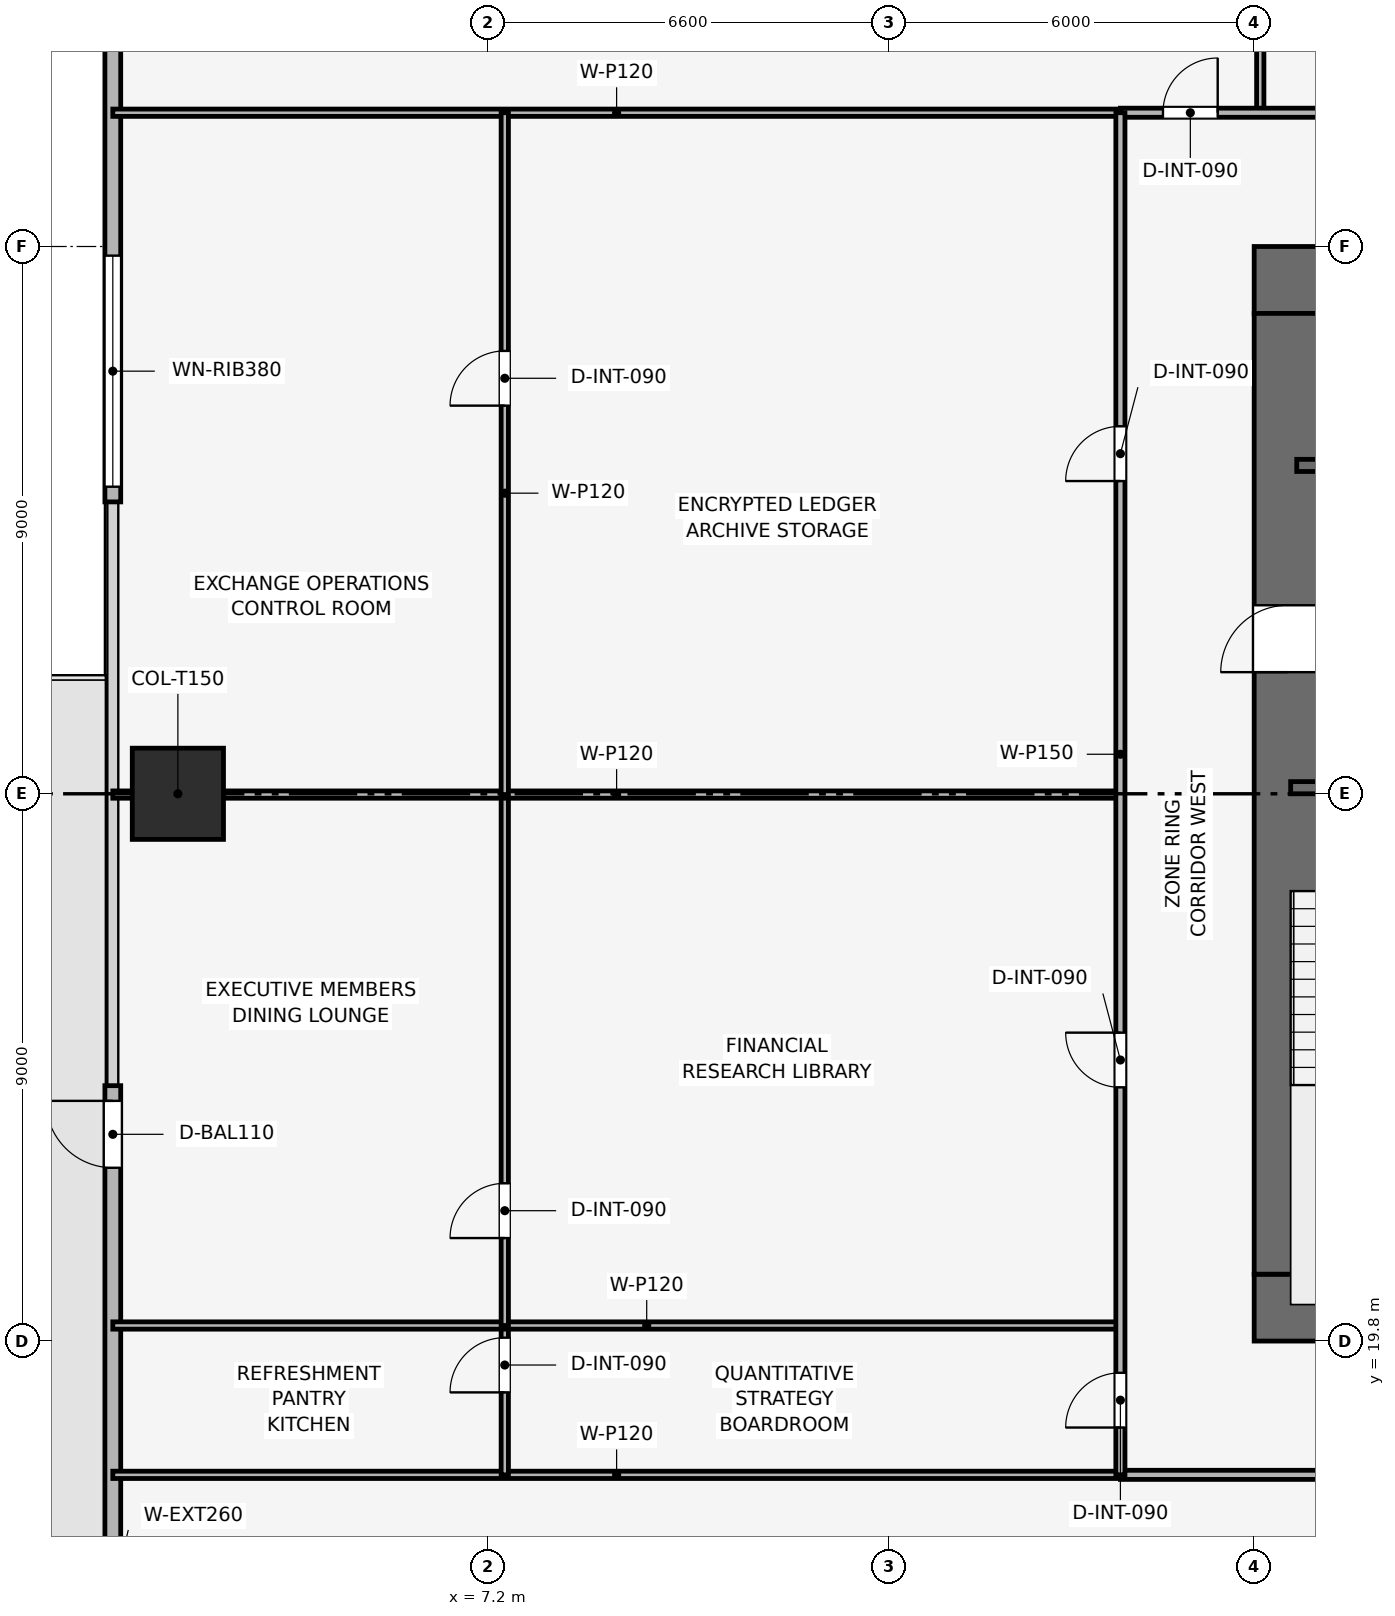
"""IFC4 building model, lengths in metres.
Left out: names, types, materials, properties, quantities, classifications, styles, units other than length and angle.
Written with IfcOpenShell. Run it as: python <this file> out.ifc"""

import sys

from ifc_helpers import new_model, si_unit, direction, frame, frame_2d, origin, origin_2d, place, context, subcontext, project, spatial, rectangle, extrude, element, fill, save


model = new_model("IFC4")
c1 = context("Model", 3, precision=1e-05, world=origin(), true_north=direction((0.0, 1.0)))
c2 = subcontext(c1, "Body", "Model", "MODEL_VIEW")
j1 = project(units=[si_unit("LENGTHUNIT", "METRE"), si_unit("PLANEANGLEUNIT", "RADIAN")], contexts=[c1])
p1 = place(None, origin())
s1 = spatial("IfcSite", under=j1, at=p1, CompositionType="ELEMENT")
p2 = place(p1, origin())
s2 = spatial("IfcBuilding", under=s1, at=p2, CompositionType="ELEMENT")
p3 = place(p2, frame((0.0, 0.0, 45.6)))
s3 = spatial("IfcBuildingStorey", under=s2, at=p3, CompositionType="ELEMENT", Elevation=45.6)
p4 = place(p3, frame((19.8, 20.35, 0.0), z_axis=(0.0, 0.0, 1.0), x_axis=(1.0, 0.0, 0.0)))
e1 = element("IfcWall", 1, at=p4, inside=s3, PredefinedType="SHEAR", context=c2, shape_type="SweptSolid", body=[
    extrude(rectangle(XDim=18.0, YDim=1.1, at=frame_2d((9.0, 0.0))), origin(), (0.0, 0.0, 1.0), 3.9),
])
p5 = place(p4, frame((8.4, 0.0, 0.0)))
e2 = element("IfcOpeningElement", 2, at=p5, cuts=e1, PredefinedType="OPENING", context=c2, shape_type="SweptSolid", body=[
    extrude(rectangle(XDim=1.2, YDim=2.2, at=frame_2d((0.6, 1.1))), frame((0.0, 0.56, 0.0), z_axis=(0.0, -1.0, 0.0), x_axis=(1.0, 0.0, 0.0)), (0.0, 0.0, 1.0), 1.12),
])
p6 = place(p3, frame((19.8, 37.25, 0.0), z_axis=(0.0, 0.0, 1.0), x_axis=(1.0, 0.0, 0.0)))
e3 = element("IfcWall", 3, at=p6, inside=s3, PredefinedType="SHEAR", context=c2, shape_type="SweptSolid", body=[
    extrude(rectangle(XDim=18.0, YDim=1.1, at=frame_2d((9.0, 0.0))), origin(), (0.0, 0.0, 1.0), 3.9),
])
p7 = place(p6, frame((7.05, 0.0, 0.0)))
e4 = element("IfcOpeningElement", 4, at=p7, cuts=e3, PredefinedType="OPENING", context=c2, shape_type="SweptSolid", body=[
    extrude(rectangle(XDim=1.1, YDim=2.15, at=frame_2d((0.55, 1.075))), frame((0.0, 0.56, 0.0), z_axis=(0.0, -1.0, 0.0), x_axis=(1.0, 0.0, 0.0)), (0.0, 0.0, 1.0), 1.12),
])
p8 = place(p3, frame((20.35, 20.9, 0.0), z_axis=(0.0, 0.0, 1.0), x_axis=(0.0, 1.0, 0.0)))
e5 = element("IfcWall", 5, at=p8, inside=s3, PredefinedType="SHEAR", context=c2, shape_type="SweptSolid", body=[
    extrude(rectangle(XDim=15.8, YDim=1.1, at=frame_2d((7.9, 0.0))), origin(), (0.0, 0.0, 1.0), 3.9),
])
p9 = place(p8, frame((9.9, 0.0, 0.0)))
e6 = element("IfcOpeningElement", 6, at=p9, cuts=e5, PredefinedType="OPENING", context=c2, shape_type="SweptSolid", body=[
    extrude(rectangle(XDim=1.1, YDim=2.15, at=frame_2d((0.55, 1.075))), frame((0.0, 0.56, 0.0), z_axis=(0.0, -1.0, 0.0), x_axis=(1.0, 0.0, 0.0)), (0.0, 0.0, 1.0), 1.12),
])
p10 = place(p3, frame((2.1, 28.8, 0.003), z_axis=(0.0, 0.0, 1.0), x_axis=(1.0, 0.0, 0.0)))
e7 = element("IfcColumn", 7, at=p10, inside=s3, PredefinedType="COLUMN", context=c2, shape_type="SweptSolid", body=[
    extrude(rectangle(XDim=1.5, YDim=1.5, at=origin_2d()), origin(), (0.0, 0.0, 1.0), 3.644),
])
p11 = place(p3, frame((1.03, 8.7, 0.0), z_axis=(0.0, 0.0, 1.0), x_axis=(0.0, 1.0, 0.0)))
e8 = element("IfcWall", 8, at=p11, inside=s3, PredefinedType="SOLIDWALL", context=c2, shape_type="SweptSolid", body=[
    extrude(rectangle(XDim=15.3, YDim=0.26, at=frame_2d((7.65, 0.0))), origin(), (0.0, 0.0, 1.0), 3.65),
])
p12 = place(p11, frame((13.95, 0.0, 0.0)))
e9 = element("IfcOpeningElement", 9, at=p12, cuts=e8, PredefinedType="OPENING", context=c2, shape_type="SweptSolid", body=[
    extrude(rectangle(XDim=1.1, YDim=2.2, at=frame_2d((0.55, 1.1))), frame((0.0, 0.14, 0.0), z_axis=(0.0, -1.0, 0.0), x_axis=(1.0, 0.0, 0.0)), (0.0, 0.0, 1.0), 0.28),
])
p13 = place(p3, frame((1.03, 33.6, 0.0), z_axis=(0.0, 0.0, 1.0), x_axis=(0.0, 1.0, 0.0)))
e10 = element("IfcWall", 10, at=p13, inside=s3, PredefinedType="SOLIDWALL", context=c2, shape_type="SweptSolid", body=[
    extrude(rectangle(XDim=15.3, YDim=0.26, at=frame_2d((7.65, 0.0))), origin(), (0.0, 0.0, 1.0), 3.65),
])
p14 = place(p13, frame((0.25, 0.0, 0.9)))
e11 = element("IfcOpeningElement", 11, at=p14, cuts=e10, PredefinedType="OPENING", context=c2, shape_type="SweptSolid", body=[
    extrude(rectangle(XDim=3.8, YDim=1.9, at=frame_2d((1.9, 0.95))), frame((0.0, 0.14, 0.0), z_axis=(0.0, -1.0, 0.0), x_axis=(1.0, 0.0, 0.0)), (0.0, 0.0, 1.0), 0.28),
])
p15 = place(p3, frame((20.4, 28.9, 0.0), z_axis=(0.0, 0.0, 1.0), x_axis=(1.0, 0.0, 0.0)))
e12 = element("IfcWall", 12, at=p15, inside=s3, PredefinedType="SHEAR", context=c2, shape_type="SweptSolid", body=[
    extrude(rectangle(XDim=3.15, YDim=0.2, at=frame_2d((1.575, 0.0))), origin(), (0.0, 0.0, 1.0), 3.65),
])
p16 = place(p15, frame((0.8, 0.0, 0.0)))
e13 = element("IfcOpeningElement", 13, at=p16, cuts=e12, PredefinedType="OPENING", context=c2, shape_type="SweptSolid", body=[
    extrude(rectangle(XDim=1.0, YDim=2.1, at=frame_2d((0.5, 1.05))), frame((0.0, 0.11, 0.0), z_axis=(0.0, -1.0, 0.0), x_axis=(1.0, 0.0, 0.0)), (0.0, 0.0, 1.0), 0.22),
])
p17 = place(p3, frame((20.5, 34.2, 0.0), z_axis=(0.0, 0.0, 1.0), x_axis=(1.0, 0.0, 0.0)))
e14 = element("IfcWall", 14, at=p17, inside=s3, PredefinedType="SHEAR", context=c2, shape_type="SweptSolid", body=[
    extrude(rectangle(XDim=3.05, YDim=0.2, at=frame_2d((1.525, 0.0))), origin(), (0.0, 0.0, 1.0), 3.65),
])
p18 = place(p17, frame((0.75, 0.0, 0.0)))
e15 = element("IfcOpeningElement", 15, at=p18, cuts=e14, PredefinedType="OPENING", context=c2, shape_type="SweptSolid", body=[
    extrude(rectangle(XDim=1.1, YDim=2.15, at=frame_2d((0.55, 1.075))), frame((0.0, 0.11, 0.0), z_axis=(0.0, -1.0, 0.0), x_axis=(1.0, 0.0, 0.0)), (0.0, 0.0, 1.0), 0.22),
])
for number, where, z_axis, x_axis in (
    (16, (19.9, 40.0, 0.0), (0.0, 0.0, 1.0), (0.0, 1.0, 0.0)),
    (17, (1.03, 17.6, 0.0), (0.0, 0.0, 1.0), (1.0, 0.0, 0.0)),
    (18, (1.03, 40.0, 0.0), (0.0, 0.0, 1.0), (1.0, 0.0, 0.0)),
):
    element("IfcWall", number, at=place(p3, frame(where, z_axis=z_axis, x_axis=x_axis)), inside=s3, PredefinedType="PARTITIONING", context=c2, shape_type="SweptSolid", body=[
        extrude(rectangle(XDim=16.57, YDim=0.12, at=frame_2d((8.285, 0.0))), origin(), (0.0, 0.0, 1.0), 2.935),
    ])
p19 = place(p3, frame((7.476, 17.6, 0.0), z_axis=(0.0, 0.0, 1.0), x_axis=(0.0, 1.0, 0.0)))
e19 = element("IfcWall", 19, at=p19, inside=s3, PredefinedType="PARTITIONING", context=c2, shape_type="SweptSolid", body=[
    extrude(rectangle(XDim=2.456, YDim=0.12, at=frame_2d((1.228, 0.0))), origin(), (0.0, 0.0, 1.0), 3.65),
])
p20 = place(p19, frame((1.356, 0.0, 0.0)))
e20 = element("IfcOpeningElement", 20, at=p20, cuts=e19, PredefinedType="OPENING", context=c2, shape_type="SweptSolid", body=[
    extrude(rectangle(XDim=0.9, YDim=2.1, at=frame_2d((0.45, 1.05))), frame((0.0, 0.07, 0.0), z_axis=(0.0, -1.0, 0.0), x_axis=(1.0, 0.0, 0.0)), (0.0, 0.0, 1.0), 0.14),
])
p21 = place(p3, frame((1.03, 20.056, 0.0), z_axis=(0.0, 0.0, 1.0), x_axis=(1.0, 0.0, 0.0)))
e21 = element("IfcWall", 21, at=p21, inside=s3, PredefinedType="PARTITIONING", context=c2, shape_type="SweptSolid", body=[
    extrude(rectangle(XDim=16.57, YDim=0.12, at=frame_2d((8.285, 0.0))), origin(), (0.0, 0.0, 1.0), 2.935),
])
p22 = place(p3, frame((7.476, 20.056, 0.0), z_axis=(0.0, 0.0, 1.0), x_axis=(0.0, 1.0, 0.0)))
e22 = element("IfcWall", 22, at=p22, inside=s3, PredefinedType="PARTITIONING", context=c2, shape_type="SweptSolid", body=[
    extrude(rectangle(XDim=8.731, YDim=0.12, at=frame_2d((4.366, 0.0))), origin(), (0.0, 0.0, 1.0), 3.085),
])
p23 = place(p22, frame((1.438, 0.0, 0.0)))
e23 = element("IfcOpeningElement", 23, at=p23, cuts=e22, PredefinedType="OPENING", context=c2, shape_type="SweptSolid", body=[
    extrude(rectangle(XDim=0.9, YDim=2.1, at=frame_2d((0.45, 1.05))), frame((0.0, 0.07, 0.0), z_axis=(0.0, -1.0, 0.0), x_axis=(1.0, 0.0, 0.0)), (0.0, 0.0, 1.0), 0.14),
])
p24 = place(p3, frame((1.03, 28.787, 0.0), z_axis=(0.0, 0.0, 1.0), x_axis=(1.0, 0.0, 0.0)))
e24 = element("IfcWall", 24, at=p24, inside=s3, PredefinedType="PARTITIONING", context=c2, shape_type="SweptSolid", body=[
    extrude(rectangle(XDim=16.57, YDim=0.12, at=frame_2d((8.285, 0.0))), origin(), (0.0, 0.0, 1.0), 3.085),
])
p25 = place(p3, frame((7.476, 28.787, 0.0), z_axis=(0.0, 0.0, 1.0), x_axis=(0.0, 1.0, 0.0)))
e25 = element("IfcWall", 25, at=p25, inside=s3, PredefinedType="PARTITIONING", context=c2, shape_type="SweptSolid", body=[
    extrude(rectangle(XDim=11.213, YDim=0.12, at=frame_2d((5.606, 0.0))), origin(), (0.0, 0.0, 1.0), 3.085),
])
p26 = place(p25, frame((6.396, 0.0, 0.0)))
e26 = element("IfcOpeningElement", 26, at=p26, cuts=e25, PredefinedType="OPENING", context=c2, shape_type="SweptSolid", body=[
    extrude(rectangle(XDim=0.9, YDim=2.1, at=frame_2d((0.45, 1.05))), frame((0.0, 0.07, 0.0), z_axis=(0.0, -1.0, 0.0), x_axis=(1.0, 0.0, 0.0)), (0.0, 0.0, 1.0), 0.14),
])
p27 = place(p3, frame((17.6, 17.6, 0.0), z_axis=(0.0, 0.0, 1.0), x_axis=(1.0, 0.0, 0.0)))
e27 = element("IfcWall", 27, at=p27, inside=s3, PredefinedType="PARTITIONING", context=c2, shape_type="SweptSolid", body=[
    extrude(rectangle(XDim=22.4, YDim=0.15, at=frame_2d((11.2, 0.0))), origin(), (0.0, 0.0, 1.0), 3.085),
])
p28 = place(p27, frame((10.75, 0.0, 0.0)))
e28 = element("IfcOpeningElement", 28, at=p28, cuts=e27, PredefinedType="OPENING", context=c2, shape_type="SweptSolid", body=[
    extrude(rectangle(XDim=0.9, YDim=2.1, at=frame_2d((0.45, 1.05))), frame((0.0, 0.085, 0.0), z_axis=(0.0, -1.0, 0.0), x_axis=(1.0, 0.0, 0.0)), (0.0, 0.0, 1.0), 0.17),
])
p29 = place(p3, frame((17.6, 40.0, 0.0), z_axis=(0.0, 0.0, 1.0), x_axis=(1.0, 0.0, 0.0)))
e29 = element("IfcWall", 29, at=p29, inside=s3, PredefinedType="PARTITIONING", context=c2, shape_type="SweptSolid", body=[
    extrude(rectangle(XDim=22.4, YDim=0.15, at=frame_2d((11.2, 0.0))), origin(), (0.0, 0.0, 1.0), 3.085),
])
p30 = place(p29, frame((0.7, 0.0, 0.0)))
e30 = element("IfcOpeningElement", 30, at=p30, cuts=e29, PredefinedType="OPENING", context=c2, shape_type="SweptSolid", body=[
    extrude(rectangle(XDim=0.9, YDim=2.1, at=frame_2d((0.45, 1.05))), frame((0.0, 0.085, 0.0), z_axis=(0.0, -1.0, 0.0), x_axis=(1.0, 0.0, 0.0)), (0.0, 0.0, 1.0), 0.17),
])
p31 = place(p29, frame((4.706, 0.0, 0.0)))
e31 = element("IfcOpeningElement", 31, at=p31, cuts=e29, PredefinedType="OPENING", context=c2, shape_type="SweptSolid", body=[
    extrude(rectangle(XDim=0.9, YDim=2.1, at=frame_2d((0.45, 1.05))), frame((0.0, 0.085, 0.0), z_axis=(0.0, -1.0, 0.0), x_axis=(1.0, 0.0, 0.0)), (0.0, 0.0, 1.0), 0.17),
])
p32 = place(p29, frame((10.704, 0.0, 0.0)))
e32 = element("IfcOpeningElement", 32, at=p32, cuts=e29, PredefinedType="OPENING", context=c2, shape_type="SweptSolid", body=[
    extrude(rectangle(XDim=0.9, YDim=2.1, at=frame_2d((0.45, 1.05))), frame((0.0, 0.085, 0.0), z_axis=(0.0, -1.0, 0.0), x_axis=(1.0, 0.0, 0.0)), (0.0, 0.0, 1.0), 0.17),
])
p33 = place(p29, frame((17.898, 0.0, 0.0)))
e33 = element("IfcOpeningElement", 33, at=p33, cuts=e29, PredefinedType="OPENING", context=c2, shape_type="SweptSolid", body=[
    extrude(rectangle(XDim=0.9, YDim=2.1, at=frame_2d((0.45, 1.05))), frame((0.0, 0.085, 0.0), z_axis=(0.0, -1.0, 0.0), x_axis=(1.0, 0.0, 0.0)), (0.0, 0.0, 1.0), 0.17),
])
p34 = place(p3, frame((17.6, 17.6, 0.0), z_axis=(0.0, 0.0, 1.0), x_axis=(0.0, 1.0, 0.0)))
e34 = element("IfcWall", 34, at=p34, inside=s3, PredefinedType="PARTITIONING", context=c2, shape_type="SweptSolid", body=[
    extrude(rectangle(XDim=22.4, YDim=0.15, at=frame_2d((11.2, 0.0))), origin(), (0.0, 0.0, 1.0), 3.085),
])
p35 = place(p34, frame((0.778, 0.0, 0.0)))
e35 = element("IfcOpeningElement", 35, at=p35, cuts=e34, PredefinedType="OPENING", context=c2, shape_type="SweptSolid", body=[
    extrude(rectangle(XDim=0.9, YDim=2.1, at=frame_2d((0.45, 1.05))), frame((0.0, 0.085, 0.0), z_axis=(0.0, -1.0, 0.0), x_axis=(1.0, 0.0, 0.0)), (0.0, 0.0, 1.0), 0.17),
])
p36 = place(p34, frame((6.372, 0.0, 0.0)))
e36 = element("IfcOpeningElement", 36, at=p36, cuts=e34, PredefinedType="OPENING", context=c2, shape_type="SweptSolid", body=[
    extrude(rectangle(XDim=0.9, YDim=2.1, at=frame_2d((0.45, 1.05))), frame((0.0, 0.085, 0.0), z_axis=(0.0, -1.0, 0.0), x_axis=(1.0, 0.0, 0.0)), (0.0, 0.0, 1.0), 0.17),
])
p37 = place(p34, frame((16.343, 0.0, 0.0)))
e37 = element("IfcOpeningElement", 37, at=p37, cuts=e34, PredefinedType="OPENING", context=c2, shape_type="SweptSolid", body=[
    extrude(rectangle(XDim=0.9, YDim=2.1, at=frame_2d((0.45, 1.05))), frame((0.0, 0.085, 0.0), z_axis=(0.0, -1.0, 0.0), x_axis=(1.0, 0.0, 0.0)), (0.0, 0.0, 1.0), 0.17),
])
p38 = place(p12, origin())
e38 = element("IfcDoor", 38, at=p38, inside=s3, OperationType="SINGLE_SWING_RIGHT", PredefinedType="DOOR", context=c2, shape_type="SweptSolid", body=[
    extrude(rectangle(XDim=1.1, YDim=2.2, at=frame_2d((0.55, 1.1))), frame((0.0, 0.025, 0.0), z_axis=(0.0, -1.0, 0.0), x_axis=(1.0, 0.0, 0.0)), (0.0, 0.0, 1.0), 0.05),
])
fill(e9, e38)
p39 = place(p14, origin())
e39 = element("IfcWindow", 39, at=p39, inside=s3, PartitioningType="SINGLE_PANEL", PredefinedType="WINDOW", context=c2, shape_type="SweptSolid", body=[
    extrude(rectangle(XDim=3.8, YDim=1.9, at=frame_2d((1.9, 0.95))), frame((0.0, 0.03, 0.0), z_axis=(0.0, -1.0, 0.0), x_axis=(1.0, 0.0, 0.0)), (0.0, 0.0, 1.0), 0.06),
])
fill(e11, e39)
p40 = place(p20, origin())
e40 = element("IfcDoor", 40, at=p40, inside=s3, OperationType="SINGLE_SWING_LEFT", PredefinedType="DOOR", context=c2, shape_type="SweptSolid", body=[
    extrude(rectangle(XDim=0.9, YDim=2.1, at=frame_2d((0.45, 1.05))), frame((0.0, 0.025, 0.0), z_axis=(0.0, -1.0, 0.0), x_axis=(1.0, 0.0, 0.0)), (0.0, 0.0, 1.0), 0.05),
])
fill(e20, e40)
p41 = place(p23, origin())
e41 = element("IfcDoor", 41, at=p41, inside=s3, OperationType="SINGLE_SWING_LEFT", PredefinedType="DOOR", context=c2, shape_type="SweptSolid", body=[
    extrude(rectangle(XDim=0.9, YDim=2.1, at=frame_2d((0.45, 1.05))), frame((0.0, 0.025, 0.0), z_axis=(0.0, -1.0, 0.0), x_axis=(1.0, 0.0, 0.0)), (0.0, 0.0, 1.0), 0.05),
])
fill(e23, e41)
p42 = place(p26, origin())
e42 = element("IfcDoor", 42, at=p42, inside=s3, OperationType="SINGLE_SWING_LEFT", PredefinedType="DOOR", context=c2, shape_type="SweptSolid", body=[
    extrude(rectangle(XDim=0.9, YDim=2.1, at=frame_2d((0.45, 1.05))), frame((0.0, 0.025, 0.0), z_axis=(0.0, -1.0, 0.0), x_axis=(1.0, 0.0, 0.0)), (0.0, 0.0, 1.0), 0.05),
])
fill(e26, e42)
p43 = place(p30, origin())
e43 = element("IfcDoor", 43, at=p43, inside=s3, OperationType="SINGLE_SWING_RIGHT", PredefinedType="DOOR", context=c2, shape_type="SweptSolid", body=[
    extrude(rectangle(XDim=0.9, YDim=2.1, at=frame_2d((0.45, 1.05))), frame((0.0, 0.025, 0.0), z_axis=(0.0, -1.0, 0.0), x_axis=(1.0, 0.0, 0.0)), (0.0, 0.0, 1.0), 0.05),
])
fill(e30, e43)
p44 = place(p35, origin())
e44 = element("IfcDoor", 44, at=p44, inside=s3, OperationType="SINGLE_SWING_LEFT", PredefinedType="DOOR", context=c2, shape_type="SweptSolid", body=[
    extrude(rectangle(XDim=0.9, YDim=2.1, at=frame_2d((0.45, 1.05))), frame((0.0, 0.025, 0.0), z_axis=(0.0, -1.0, 0.0), x_axis=(1.0, 0.0, 0.0)), (0.0, 0.0, 1.0), 0.05),
])
fill(e35, e44)
p45 = place(p36, origin())
e45 = element("IfcDoor", 45, at=p45, inside=s3, OperationType="SINGLE_SWING_RIGHT", PredefinedType="DOOR", context=c2, shape_type="SweptSolid", body=[
    extrude(rectangle(XDim=0.9, YDim=2.1, at=frame_2d((0.45, 1.05))), frame((0.0, 0.025, 0.0), z_axis=(0.0, -1.0, 0.0), x_axis=(1.0, 0.0, 0.0)), (0.0, 0.0, 1.0), 0.05),
])
fill(e36, e45)
p46 = place(p37, origin())
e46 = element("IfcDoor", 46, at=p46, inside=s3, OperationType="SINGLE_SWING_LEFT", PredefinedType="DOOR", context=c2, shape_type="SweptSolid", body=[
    extrude(rectangle(XDim=0.9, YDim=2.1, at=frame_2d((0.45, 1.05))), frame((0.0, 0.025, 0.0), z_axis=(0.0, -1.0, 0.0), x_axis=(1.0, 0.0, 0.0)), (0.0, 0.0, 1.0), 0.05),
])
fill(e37, e46)
p47 = place(p9, origin())
e47 = element("IfcDoor", 47, at=p47, inside=s3, OperationType="SINGLE_SWING_LEFT", PredefinedType="DOOR", context=c2, shape_type="SweptSolid", body=[
    extrude(rectangle(XDim=1.1, YDim=2.15, at=frame_2d((0.55, 1.075))), frame((0.0, 0.025, 0.0), z_axis=(0.0, -1.0, 0.0), x_axis=(1.0, 0.0, 0.0)), (0.0, 0.0, 1.0), 0.05),
])
fill(e6, e47)
save(model, sys.argv[1])
